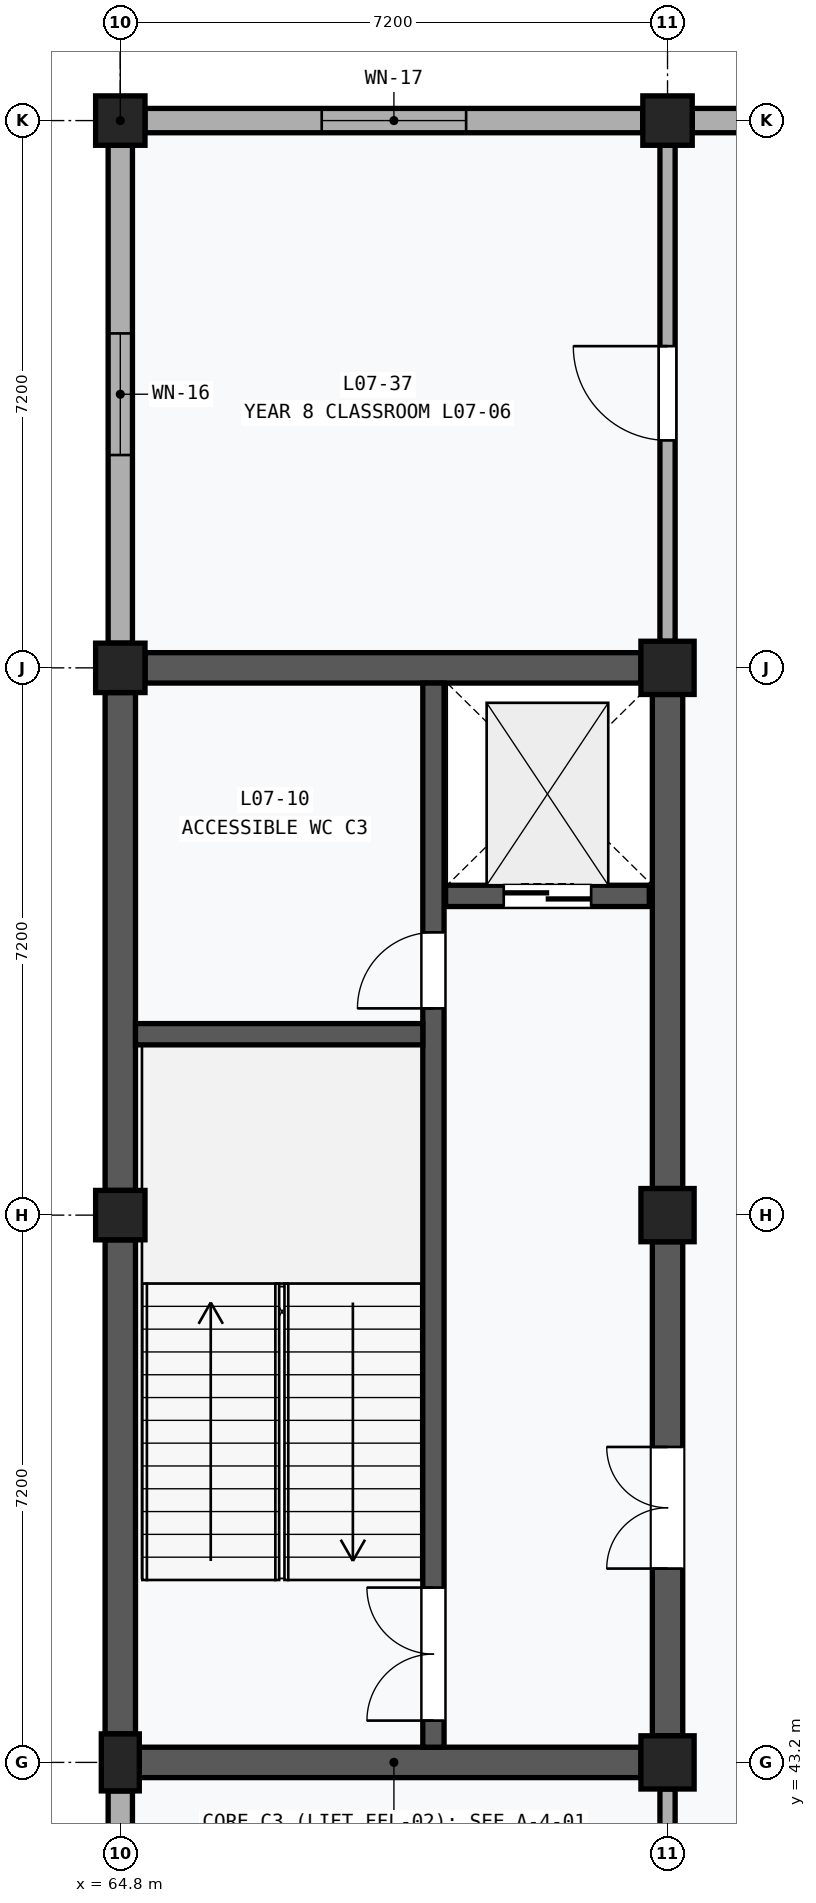
"""IFC4 building model, lengths in metres.
Left out: names, types, materials, properties, quantities, classifications, styles, units other than length and angle.
Written with IfcOpenShell. Run it as: python <this file> out.ifc"""

import sys

from ifc_helpers import new_model, si_unit, direction, frame, frame_2d, origin, origin_2d, place, context, subcontext, project, spatial, rectangle, extrude, element, fill, save


model = new_model("IFC4")
c1 = context("Model", 3, precision=1e-05, world=origin(), true_north=direction((0.0, 1.0)))
c2 = subcontext(c1, "Body", "Model", "MODEL_VIEW")
j1 = project(units=[si_unit("LENGTHUNIT", "METRE"), si_unit("PLANEANGLEUNIT", "RADIAN")], contexts=[c1])
p1 = place(None, origin())
s1 = spatial("IfcSite", under=j1, at=p1, CompositionType="ELEMENT")
p2 = place(p1, origin())
s2 = spatial("IfcBuilding", under=s1, at=p2, CompositionType="ELEMENT")
p3 = place(p2, frame((0.0, 0.0, 30.6)))
s3 = spatial("IfcBuildingStorey", under=s2, at=p3, CompositionType="ELEMENT", Elevation=30.6)
p4 = place(p3, frame((64.8, 43.2, 0.0), z_axis=(0.0, 0.0, 1.0), x_axis=(1.0, 0.0, 0.0)))
e1 = element("IfcColumn", 1, at=p4, inside=s3, PredefinedType="PILASTER", context=c2, shape_type="SweptSolid", body=[
    extrude(rectangle(XDim=0.5, YDim=0.75, at=origin_2d()), origin(), (0.0, 0.0, 1.0), 4.2),
])
for number, where, z_axis, x_axis in (
    (2, (64.8, 50.4, 0.0), (0.0, 0.0, 1.0), (1.0, 0.0, 0.0)),
    (3, (64.8, 57.6, 0.0), (0.0, 0.0, 1.0), (1.0, 0.0, 0.0)),
    (4, (64.8, 64.8, 0.0), (0.0, 0.0, 1.0), (1.0, 0.0, 0.0)),
):
    element("IfcColumn", number, at=place(p3, frame(where, z_axis=z_axis, x_axis=x_axis)), inside=s3, PredefinedType="COLUMN", context=c2, shape_type="SweptSolid", body=[
        extrude(rectangle(XDim=0.65, YDim=0.65, at=origin_2d()), origin(), (0.0, 0.0, 1.0), 4.2),
    ])
for number, where, z_axis, x_axis in (
    (5, (72.0, 43.2, 0.0), (0.0, 0.0, 1.0), (1.0, 0.0, 0.0)),
    (6, (72.0, 50.4, 0.0), (0.0, 0.0, 1.0), (1.0, 0.0, 0.0)),
    (7, (72.0, 57.6, 0.0), (0.0, 0.0, 1.0), (1.0, 0.0, 0.0)),
):
    element("IfcColumn", number, at=place(p3, frame(where, z_axis=z_axis, x_axis=x_axis)), inside=s3, PredefinedType="COLUMN", context=c2, shape_type="SweptSolid", body=[
        extrude(rectangle(XDim=0.7, YDim=0.7, at=origin_2d()), origin(), (0.0, 0.0, 1.0), 4.2),
    ])
p5 = place(p3, frame((72.0, 64.8, 0.0), z_axis=(0.0, 0.0, 1.0), x_axis=(1.0, 0.0, 0.0)))
e8 = element("IfcColumn", 8, at=p5, inside=s3, PredefinedType="COLUMN", context=c2, shape_type="SweptSolid", body=[
    extrude(rectangle(XDim=0.65, YDim=0.65, at=origin_2d()), origin(), (0.0, 0.0, 1.0), 4.2),
])
p6 = place(p3, frame((64.8, 36.325, 0.0), z_axis=(0.0, 0.0, 1.0), x_axis=(0.0, 1.0, 0.0)))
e9 = element("IfcWall", 9, at=p6, inside=s3, PredefinedType="SOLIDWALL", context=c2, shape_type="SweptSolid", body=[
    extrude(rectangle(XDim=6.5, YDim=0.32, at=frame_2d((3.25, 0.0))), origin(), (0.0, 0.0, 1.0), 3.25),
])
p7 = place(p6, frame((1.9, 0.0, 0.85)))
e10 = element("IfcOpeningElement", 10, at=p7, cuts=e9, PredefinedType="OPENING", context=c2, shape_type="SweptSolid", body=[
    extrude(rectangle(XDim=2.7, YDim=2.0, at=frame_2d((1.35, 1.0))), frame((0.0, 0.172, 0.0), z_axis=(0.0, -1.0, 0.0), x_axis=(1.0, 0.0, 0.0)), (0.0, 0.0, 1.0), 0.344),
])
p8 = place(p3, frame((65.125, 64.8, 0.0), z_axis=(0.0, 0.0, 1.0), x_axis=(1.0, 0.0, 0.0)))
e11 = element("IfcWall", 11, at=p8, inside=s3, PredefinedType="SOLIDWALL", context=c2, shape_type="SweptSolid", body=[
    extrude(rectangle(XDim=6.55, YDim=0.32, at=frame_2d((3.275, 0.0))), origin(), (0.0, 0.0, 1.0), 3.25),
])
p9 = place(p8, frame((2.325, 0.0, 1.1)))
e12 = element("IfcOpeningElement", 12, at=p9, cuts=e11, PredefinedType="OPENING", context=c2, shape_type="SweptSolid", body=[
    extrude(rectangle(XDim=1.9, YDim=1.5, at=frame_2d((0.95, 0.75))), frame((0.0, 0.172, 0.0), z_axis=(0.0, -1.0, 0.0), x_axis=(1.0, 0.0, 0.0)), (0.0, 0.0, 1.0), 0.344),
])
p10 = place(p3, frame((64.8, 57.925, 0.0), z_axis=(0.0, 0.0, 1.0), x_axis=(0.0, 1.0, 0.0)))
e13 = element("IfcWall", 13, at=p10, inside=s3, PredefinedType="SOLIDWALL", context=c2, shape_type="SweptSolid", body=[
    extrude(rectangle(XDim=6.55, YDim=0.32, at=frame_2d((3.275, 0.0))), origin(), (0.0, 0.0, 1.0), 3.25),
])
p11 = place(p10, frame((2.475, 0.0, 1.1)))
e14 = element("IfcOpeningElement", 14, at=p11, cuts=e13, PredefinedType="OPENING", context=c2, shape_type="SweptSolid", body=[
    extrude(rectangle(XDim=1.6, YDim=1.5, at=frame_2d((0.8, 0.75))), frame((0.0, 0.172, 0.0), z_axis=(0.0, -1.0, 0.0), x_axis=(1.0, 0.0, 0.0)), (0.0, 0.0, 1.0), 0.344),
])
p12 = place(p3, frame((72.325, 64.8, 0.0), z_axis=(0.0, 0.0, 1.0), x_axis=(1.0, 0.0, 0.0)))
e15 = element("IfcWall", 15, at=p12, inside=s3, PredefinedType="SOLIDWALL", context=c2, shape_type="SweptSolid", body=[
    extrude(rectangle(XDim=6.625, YDim=0.32, at=frame_2d((3.312, 0.0))), origin(), (0.0, 0.0, 1.0), 3.25),
])
p13 = place(p12, frame((2.212, 0.0, 1.1)))
e16 = element("IfcOpeningElement", 16, at=p13, cuts=e15, PredefinedType="OPENING", context=c2, shape_type="SweptSolid", body=[
    extrude(rectangle(XDim=2.2, YDim=1.5, at=frame_2d((1.1, 0.75))), frame((0.0, 0.172, 0.0), z_axis=(0.0, -1.0, 0.0), x_axis=(1.0, 0.0, 0.0)), (0.0, 0.0, 1.0), 0.344),
])
p14 = place(p3, frame((64.8, 43.575, 0.0), z_axis=(0.0, 0.0, 1.0), x_axis=(0.0, 1.0, 0.0)))
e17 = element("IfcWall", 17, at=p14, inside=s3, PredefinedType="SHEAR", context=c2, shape_type="SweptSolid", body=[
    extrude(rectangle(XDim=6.5, YDim=0.4, at=frame_2d((3.25, 0.0))), origin(), (0.0, 0.0, 1.0), 3.25),
])
p15 = place(p3, frame((64.8, 50.725, 0.0), z_axis=(0.0, 0.0, 1.0), x_axis=(0.0, 1.0, 0.0)))
e18 = element("IfcWall", 18, at=p15, inside=s3, PredefinedType="SHEAR", context=c2, shape_type="SweptSolid", body=[
    extrude(rectangle(XDim=6.55, YDim=0.4, at=frame_2d((3.275, 0.0))), origin(), (0.0, 0.0, 1.0), 3.25),
])
p16 = place(p3, frame((72.0, 43.55, 0.0), z_axis=(0.0, 0.0, 1.0), x_axis=(0.0, 1.0, 0.0)))
e19 = element("IfcWall", 19, at=p16, inside=s3, PredefinedType="SHEAR", context=c2, shape_type="SweptSolid", body=[
    extrude(rectangle(XDim=6.5, YDim=0.4, at=frame_2d((3.25, 0.0))), origin(), (0.0, 0.0, 1.0), 3.11),
])
p17 = place(p16, frame((2.2, 0.0, 0.0)))
e20 = element("IfcOpeningElement", 20, at=p17, cuts=e19, PredefinedType="OPENING", context=c2, shape_type="SweptSolid", body=[
    extrude(rectangle(XDim=1.6, YDim=2.2, at=frame_2d((0.8, 1.1))), frame((0.0, 0.212, 0.0), z_axis=(0.0, -1.0, 0.0), x_axis=(1.0, 0.0, 0.0)), (0.0, 0.0, 1.0), 0.424),
])
p18 = place(p3, frame((72.0, 50.75, 0.0), z_axis=(0.0, 0.0, 1.0), x_axis=(0.0, 1.0, 0.0)))
e21 = element("IfcWall", 21, at=p18, inside=s3, PredefinedType="SHEAR", context=c2, shape_type="SweptSolid", body=[
    extrude(rectangle(XDim=6.5, YDim=0.4, at=frame_2d((3.25, 0.0))), origin(), (0.0, 0.0, 1.0), 3.11),
])
p19 = place(p3, frame((65.05, 43.2, 0.0), z_axis=(0.0, 0.0, 1.0), x_axis=(1.0, 0.0, 0.0)))
e22 = element("IfcWall", 22, at=p19, inside=s3, PredefinedType="SHEAR", context=c2, shape_type="SweptSolid", body=[
    extrude(rectangle(XDim=6.6, YDim=0.4, at=frame_2d((3.3, 0.0))), origin(), (0.0, 0.0, 1.0), 3.11),
])
p20 = place(p3, frame((65.125, 57.6, 0.0), z_axis=(0.0, 0.0, 1.0), x_axis=(1.0, 0.0, 0.0)))
e23 = element("IfcWall", 23, at=p20, inside=s3, PredefinedType="SHEAR", context=c2, shape_type="SweptSolid", body=[
    extrude(rectangle(XDim=6.525, YDim=0.4, at=frame_2d((3.262, 0.0))), origin(), (0.0, 0.0, 1.0), 3.11),
])
p21 = place(p3, frame((68.92, 43.4, 0.0), z_axis=(0.0, 0.0, 1.0), x_axis=(0.0, 1.0, 0.0)))
e24 = element("IfcWall", 24, at=p21, inside=s3, PredefinedType="SHEAR", context=c2, shape_type="SweptSolid", body=[
    extrude(rectangle(XDim=14.0, YDim=0.28, at=frame_2d((7.0, 0.0))), origin(), (0.0, 0.0, 1.0), 3.88),
])
p22 = place(p21, frame((0.35, 0.0, 0.0)))
e25 = element("IfcOpeningElement", 25, at=p22, cuts=e24, PredefinedType="OPENING", context=c2, shape_type="SweptSolid", body=[
    extrude(rectangle(XDim=1.75, YDim=2.15, at=frame_2d((0.875, 1.075))), frame((0.0, 0.152, 0.0), z_axis=(0.0, -1.0, 0.0), x_axis=(1.0, 0.0, 0.0)), (0.0, 0.0, 1.0), 0.304),
])
p23 = place(p21, frame((9.72, 0.0, 0.0)))
e26 = element("IfcOpeningElement", 26, at=p23, cuts=e24, PredefinedType="OPENING", context=c2, shape_type="SweptSolid", body=[
    extrude(rectangle(XDim=1.0, YDim=2.15, at=frame_2d((0.5, 1.075))), frame((0.0, 0.152, 0.0), z_axis=(0.0, -1.0, 0.0), x_axis=(1.0, 0.0, 0.0)), (0.0, 0.0, 1.0), 0.304),
])
p24 = place(p3, frame((65.0, 52.78, 0.0), z_axis=(0.0, 0.0, 1.0), x_axis=(1.0, 0.0, 0.0)))
e27 = element("IfcWall", 27, at=p24, inside=s3, PredefinedType="SHEAR", context=c2, shape_type="SweptSolid", body=[
    extrude(rectangle(XDim=3.78, YDim=0.28, at=frame_2d((1.89, 0.0))), origin(), (0.0, 0.0, 1.0), 3.88),
])
p25 = place(p3, frame((69.08, 54.6, 0.0), z_axis=(0.0, 0.0, 1.0), x_axis=(1.0, 0.0, 0.0)))
e28 = element("IfcWall", 28, at=p25, inside=s3, PredefinedType="SHEAR", context=c2, shape_type="SweptSolid", body=[
    extrude(rectangle(XDim=2.68, YDim=0.28, at=frame_2d((1.34, 0.0))), origin(), (0.0, 0.0, 1.0), 3.88),
])
p26 = place(p25, frame((0.765, 0.0, 0.0)))
e29 = element("IfcOpeningElement", 29, at=p26, cuts=e28, PredefinedType="OPENING", context=c2, shape_type="SweptSolid", body=[
    extrude(rectangle(XDim=1.15, YDim=2.2, at=frame_2d((0.575, 1.1))), frame((0.0, 0.152, 0.0), z_axis=(0.0, -1.0, 0.0), x_axis=(1.0, 0.0, 0.0)), (0.0, 0.0, 1.0), 0.304),
])
p27 = place(p3, frame((72.0, 36.35, 0.0), z_axis=(0.0, 0.0, 1.0), x_axis=(0.0, 1.0, 0.0)))
e30 = element("IfcWall", 30, at=p27, inside=s3, PredefinedType="PARTITIONING", context=c2, shape_type="SweptSolid", body=[
    extrude(rectangle(XDim=6.5, YDim=0.2, at=frame_2d((3.25, 0.0))), origin(), (0.0, 0.0, 1.0), 3.11),
])
p28 = place(p27, frame((2.65, 0.0, 0.0)))
e31 = element("IfcOpeningElement", 31, at=p28, cuts=e30, PredefinedType="OPENING", context=c2, shape_type="SweptSolid", body=[
    extrude(rectangle(XDim=1.2, YDim=2.24, at=frame_2d((0.6, 1.12))), frame((0.0, 0.112, 0.0), z_axis=(0.0, -1.0, 0.0), x_axis=(1.0, 0.0, 0.0)), (0.0, 0.0, 1.0), 0.224),
])
p29 = place(p3, frame((72.0, 57.95, 0.0), z_axis=(0.0, 0.0, 1.0), x_axis=(0.0, 1.0, 0.0)))
e32 = element("IfcWall", 32, at=p29, inside=s3, PredefinedType="PARTITIONING", context=c2, shape_type="SweptSolid", body=[
    extrude(rectangle(XDim=6.525, YDim=0.2, at=frame_2d((3.263, 0.0))), origin(), (0.0, 0.0, 1.0), 3.11),
])
p30 = place(p29, frame((2.643, 0.0, 0.0)))
e33 = element("IfcOpeningElement", 33, at=p30, cuts=e32, PredefinedType="OPENING", context=c2, shape_type="SweptSolid", body=[
    extrude(rectangle(XDim=1.24, YDim=2.26, at=frame_2d((0.62, 1.13))), frame((0.0, 0.112, 0.0), z_axis=(0.0, -1.0, 0.0), x_axis=(1.0, 0.0, 0.0)), (0.0, 0.0, 1.0), 0.224),
])
p31 = place(p9, origin())
e34 = element("IfcWindow", 34, at=p31, inside=s3, PartitioningType="SINGLE_PANEL", PredefinedType="WINDOW", context=c2, shape_type="SweptSolid", body=[
    extrude(rectangle(XDim=1.9, YDim=1.5, at=frame_2d((0.95, 0.75))), frame((0.0, 0.03, 0.0), z_axis=(0.0, -1.0, 0.0), x_axis=(1.0, 0.0, 0.0)), (0.0, 0.0, 1.0), 0.06),
])
fill(e12, e34)
p32 = place(p11, origin())
e35 = element("IfcWindow", 35, at=p32, inside=s3, PartitioningType="SINGLE_PANEL", PredefinedType="WINDOW", context=c2, shape_type="SweptSolid", body=[
    extrude(rectangle(XDim=1.6, YDim=1.5, at=frame_2d((0.8, 0.75))), frame((0.0, 0.03, 0.0), z_axis=(0.0, -1.0, 0.0), x_axis=(1.0, 0.0, 0.0)), (0.0, 0.0, 1.0), 0.06),
])
fill(e14, e35)
p33 = place(p17, origin())
e36 = element("IfcDoor", 36, at=p33, inside=s3, OperationType="DOUBLE_DOOR_SINGLE_SWING", PredefinedType="DOOR", context=c2, shape_type="SweptSolid", body=[
    extrude(rectangle(XDim=1.6, YDim=2.2, at=frame_2d((0.8, 1.1))), frame((0.0, 0.025, 0.0), z_axis=(0.0, -1.0, 0.0), x_axis=(1.0, 0.0, 0.0)), (0.0, 0.0, 1.0), 0.05),
])
fill(e20, e36)
p34 = place(p22, origin())
e37 = element("IfcDoor", 37, at=p34, inside=s3, OperationType="DOUBLE_DOOR_SINGLE_SWING", PredefinedType="DOOR", context=c2, shape_type="SweptSolid", body=[
    extrude(rectangle(XDim=1.75, YDim=2.15, at=frame_2d((0.875, 1.075))), frame((0.0, 0.025, 0.0), z_axis=(0.0, -1.0, 0.0), x_axis=(1.0, 0.0, 0.0)), (0.0, 0.0, 1.0), 0.05),
])
fill(e25, e37)
p35 = place(p23, origin())
e38 = element("IfcDoor", 38, at=p35, inside=s3, OperationType="SINGLE_SWING_LEFT", PredefinedType="DOOR", context=c2, shape_type="SweptSolid", body=[
    extrude(rectangle(XDim=1.0, YDim=2.15, at=frame_2d((0.5, 1.075))), frame((0.0, 0.025, 0.0), z_axis=(0.0, -1.0, 0.0), x_axis=(1.0, 0.0, 0.0)), (0.0, 0.0, 1.0), 0.05),
])
fill(e26, e38)
p36 = place(p26, frame((1.15, 0.0, 0.0), z_axis=(0.0, 0.0, 1.0), x_axis=(-1.0, 0.0, 0.0)))
e39 = element("IfcDoor", 39, at=p36, inside=s3, OperationType="DOUBLE_DOOR_SLIDING", PredefinedType="DOOR", context=c2, shape_type="SweptSolid", body=[
    extrude(rectangle(XDim=1.15, YDim=2.2, at=frame_2d((0.575, 1.1))), frame((0.0, 0.025, 0.0), z_axis=(0.0, -1.0, 0.0), x_axis=(1.0, 0.0, 0.0)), (0.0, 0.0, 1.0), 0.05),
])
fill(e29, e39)
p37 = place(p30, origin())
e40 = element("IfcDoor", 40, at=p37, inside=s3, OperationType="SINGLE_SWING_RIGHT", PredefinedType="DOOR", context=c2, shape_type="SweptSolid", body=[
    extrude(rectangle(XDim=1.24, YDim=2.26, at=frame_2d((0.62, 1.13))), frame((0.0, 0.025, 0.0), z_axis=(0.0, -1.0, 0.0), x_axis=(1.0, 0.0, 0.0)), (0.0, 0.0, 1.0), 0.05),
])
fill(e33, e40)
save(model, sys.argv[1])
